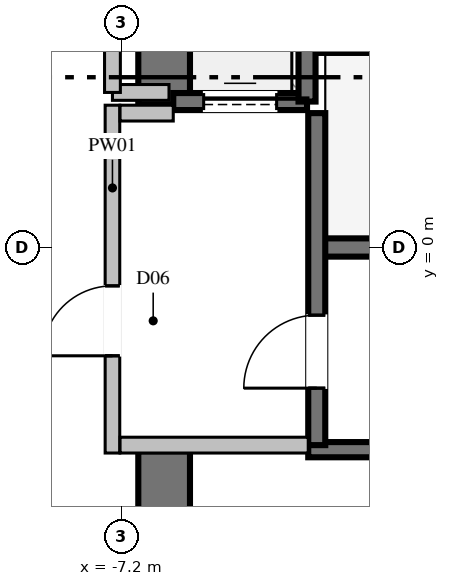
"""IFC4 building model, lengths in metres.
Left out: names, types, materials, properties, quantities, classifications, styles, units other than length and angle.
Written with IfcOpenShell. Run it as: python <this file> out.ifc"""

import sys

from ifc_helpers import new_model, si_unit, direction, frame, frame_2d, origin, place, context, subcontext, project, spatial, rectangle, extrude, element, fill, save


model = new_model("IFC4")
c1 = context("Model", 3, precision=1e-05, world=origin(), true_north=direction((0.0, 1.0)))
c2 = subcontext(c1, "Body", "Model", "MODEL_VIEW")
j1 = project(units=[si_unit("LENGTHUNIT", "METRE"), si_unit("PLANEANGLEUNIT", "RADIAN")], contexts=[c1])
p1 = place(None, origin())
s1 = spatial("IfcSite", under=j1, at=p1, CompositionType="ELEMENT")
p2 = place(p1, origin())
s2 = spatial("IfcBuilding", under=s1, at=p2, CompositionType="ELEMENT")
p3 = place(p2, frame((0.0, 0.0, -9.6)))
s3 = spatial("IfcBuildingStorey", under=s2, at=p3, CompositionType="ELEMENT", Elevation=-9.6)
p4 = place(p3, frame((-3.99, 0.0, 0.0), z_axis=(0.0, 0.0, 1.0), x_axis=(1.0, 0.0, 0.0)))
e1 = element("IfcWall", 1, at=p4, inside=s3, PredefinedType="SHEAR", context=c2, shape_type="SweptSolid", body=[
    extrude(rectangle(XDim=7.98, YDim=0.3, at=frame_2d((3.99, 0.0))), origin(), (0.0, 0.0, 1.0), 4.8),
])
for number, where, z_axis, x_axis in (
    (2, (-4.13, -3.325, 0.0), (0.0, 0.0, 1.0), (1.0, 0.0, 0.0)),
    (3, (-4.13, 3.325, 0.0), (0.0, 0.0, 1.0), (1.0, 0.0, 0.0)),
):
    element("IfcWall", number, at=place(p3, frame(where, z_axis=z_axis, x_axis=x_axis)), inside=s3, PredefinedType="SOLIDWALL", context=c2, shape_type="SweptSolid", body=[
        extrude(rectangle(XDim=8.26, YDim=0.25, at=frame_2d((4.13, 0.0))), origin(), (0.0, 0.0, 1.0), 4.8),
    ])
p5 = place(p3, frame((-6.5, 2.35, 0.0), z_axis=(0.0, 0.0, 1.0), x_axis=(0.0, 1.0, 0.0)))
e4 = element("IfcWall", 4, at=p5, inside=s3, PredefinedType="SHEAR", context=c2, shape_type="SweptSolid", body=[
    extrude(rectangle(XDim=4.175, YDim=0.85, at=frame_2d((2.087, 0.0))), origin(), (0.0, 0.0, 1.0), 4.8),
])
p6 = place(p3, frame((-6.5, -6.525, 0.0), z_axis=(0.0, 0.0, 1.0), x_axis=(0.0, 1.0, 0.0)))
e5 = element("IfcWall", 5, at=p6, inside=s3, PredefinedType="SHEAR", context=c2, shape_type="SweptSolid", body=[
    extrude(rectangle(XDim=3.175, YDim=0.85, at=frame_2d((1.587, 0.0))), origin(), (0.0, 0.0, 1.0), 4.8),
])
p7 = place(p3, frame((-6.35, 2.4, 0.0), z_axis=(0.0, 0.0, 1.0), x_axis=(1.0, 0.0, 0.0)))
e6 = element("IfcWall", 6, at=p7, inside=s3, PredefinedType="SOLIDWALL", context=c2, shape_type="SweptSolid", body=[
    extrude(rectangle(XDim=2.2, YDim=0.28, at=frame_2d((1.1, 0.0))), origin(), (0.0, 0.0, 1.0), 4.46),
])
p8 = place(p7, frame((0.5, 0.0, 0.0)))
e7 = element("IfcOpeningElement", 7, at=p8, cuts=e6, PredefinedType="OPENING", context=c2, shape_type="SweptSolid", body=[
    extrude(rectangle(XDim=1.2, YDim=2.2, at=frame_2d((0.6, 1.1))), frame((0.0, 0.15, 0.0), z_axis=(0.0, -1.0, 0.0), x_axis=(1.0, 0.0, 0.0)), (0.0, 0.0, 1.0), 0.3),
])
p9 = place(p3, frame((-4.15, 2.4, 0.0), z_axis=(0.0, 0.0, 1.0), x_axis=(0.0, 1.0, 0.0)))
e8 = element("IfcWall", 8, at=p9, inside=s3, PredefinedType="SOLIDWALL", context=c2, shape_type="SweptSolid", body=[
    extrude(rectangle(XDim=2.7, YDim=0.28, at=frame_2d((1.35, 0.0))), origin(), (0.0, 0.0, 1.0), 4.46),
])
p10 = place(p3, frame((-3.99, -3.25, 0.0), z_axis=(0.0, 0.0, 1.0), x_axis=(0.0, 1.0, 0.0)))
e9 = element("IfcWall", 9, at=p10, inside=s3, PredefinedType="SOLIDWALL", context=c2, shape_type="SweptSolid", body=[
    extrude(rectangle(XDim=5.46, YDim=0.28, at=frame_2d((2.73, 0.0))), origin(), (0.0, 0.0, 1.0), 4.46),
])
p11 = place(p10, frame((0.937, 0.0, 0.0)))
e10 = element("IfcOpeningElement", 10, at=p11, cuts=e9, PredefinedType="OPENING", context=c2, shape_type="SweptSolid", body=[
    extrude(rectangle(XDim=1.2, YDim=2.2, at=frame_2d((0.6, 1.1))), frame((0.0, 0.15, 0.0), z_axis=(0.0, -1.0, 0.0), x_axis=(1.0, 0.0, 0.0)), (0.0, 0.0, 1.0), 0.3),
])
p12 = place(p3, frame((-7.35, -3.38, 0.0), z_axis=(0.0, 0.0, 1.0), x_axis=(0.0, 1.0, 0.0)))
e11 = element("IfcWall", 11, at=p12, inside=s3, PredefinedType="PARTITIONING", context=c2, shape_type="SweptSolid", body=[
    extrude(rectangle(XDim=5.72, YDim=0.24, at=frame_2d((2.86, 0.0))), origin(), (0.0, 0.0, 1.0), 3.345),
])
p13 = place(p12, frame((1.599, 0.0, 0.0)))
e12 = element("IfcOpeningElement", 12, at=p13, cuts=e11, PredefinedType="OPENING", context=c2, shape_type="SweptSolid", body=[
    extrude(rectangle(XDim=1.15, YDim=2.2, at=frame_2d((0.575, 1.1))), frame((0.0, 0.13, 0.0), z_axis=(0.0, -1.0, 0.0), x_axis=(1.0, 0.0, 0.0)), (0.0, 0.0, 1.0), 0.26),
])
p14 = place(p3, frame((-7.225, -3.25, 0.0), z_axis=(0.0, 0.0, 1.0), x_axis=(1.0, 0.0, 0.0)))
e13 = element("IfcWall", 13, at=p14, inside=s3, PredefinedType="PARTITIONING", context=c2, shape_type="SweptSolid", body=[
    extrude(rectangle(XDim=3.095, YDim=0.26, at=frame_2d((1.548, 0.0))), origin(), (0.0, 0.0, 1.0), 4.46),
])
p15 = place(p3, frame((-7.225, 2.21, 0.0), z_axis=(0.0, 0.0, 1.0), x_axis=(1.0, 0.0, 0.0)))
e14 = element("IfcWall", 14, at=p15, inside=s3, PredefinedType="PARTITIONING", context=c2, shape_type="SweptSolid", body=[
    extrude(rectangle(XDim=0.875, YDim=0.26, at=frame_2d((0.438, 0.0))), origin(), (0.0, 0.0, 1.0), 4.46),
])
p16 = place(p3, frame((-7.35, 2.55, 0.0), z_axis=(0.0, 0.0, 1.0), x_axis=(1.0, 0.0, 0.0)))
e15 = element("IfcWall", 15, at=p16, inside=s3, PredefinedType="PARTITIONING", context=c2, shape_type="SweptSolid", body=[
    extrude(rectangle(XDim=0.93, YDim=0.26, at=frame_2d((0.465, 0.0))), origin(), (0.0, 0.0, 1.0), 4.46),
])
p17 = place(p3, frame((-7.35, 2.55, 0.0), z_axis=(0.0, 0.0, 1.0), x_axis=(0.0, 1.0, 0.0)))
e16 = element("IfcWall", 16, at=p17, inside=s3, PredefinedType="PARTITIONING", context=c2, shape_type="SweptSolid", body=[
    extrude(rectangle(XDim=2.4, YDim=0.26, at=frame_2d((1.2, 0.0))), origin(), (0.0, 0.0, 1.0), 3.345),
])
p18 = place(p17, frame((0.775, 0.0, 0.0)))
e17 = element("IfcOpeningElement", 17, at=p18, cuts=e16, PredefinedType="OPENING", context=c2, shape_type="SweptSolid", body=[
    extrude(rectangle(XDim=0.85, YDim=2.05, at=frame_2d((0.425, 1.025))), frame((0.0, 0.14, 0.0), z_axis=(0.0, -1.0, 0.0), x_axis=(1.0, 0.0, 0.0)), (0.0, 0.0, 1.0), 0.28),
])
p19 = place(p8, origin())
e18 = element("IfcDoor", 18, at=p19, inside=s3, OperationType="SLIDING_TO_LEFT", PredefinedType="DOOR", context=c2, shape_type="SweptSolid", body=[
    extrude(rectangle(XDim=1.2, YDim=2.2, at=frame_2d((0.6, 1.1))), frame((0.0, 0.025, 0.0), z_axis=(0.0, -1.0, 0.0), x_axis=(1.0, 0.0, 0.0)), (0.0, 0.0, 1.0), 0.05),
])
fill(e7, e18)
p20 = place(p11, origin())
e19 = element("IfcDoor", 19, at=p20, inside=s3, OperationType="SINGLE_SWING_LEFT", PredefinedType="DOOR", context=c2, shape_type="SweptSolid", body=[
    extrude(rectangle(XDim=1.2, YDim=2.2, at=frame_2d((0.6, 1.1))), frame((0.0, 0.025, 0.0), z_axis=(0.0, -1.0, 0.0), x_axis=(1.0, 0.0, 0.0)), (0.0, 0.0, 1.0), 0.05),
])
fill(e10, e19)
p21 = place(p13, origin())
e20 = element("IfcDoor", 20, at=p21, inside=s3, OperationType="SINGLE_SWING_LEFT", PredefinedType="DOOR", context=c2, shape_type="SweptSolid", body=[
    extrude(rectangle(XDim=1.15, YDim=2.2, at=frame_2d((0.575, 1.1))), frame((0.0, 0.025, 0.0), z_axis=(0.0, -1.0, 0.0), x_axis=(1.0, 0.0, 0.0)), (0.0, 0.0, 1.0), 0.05),
])
fill(e12, e20)
save(model, sys.argv[1])
